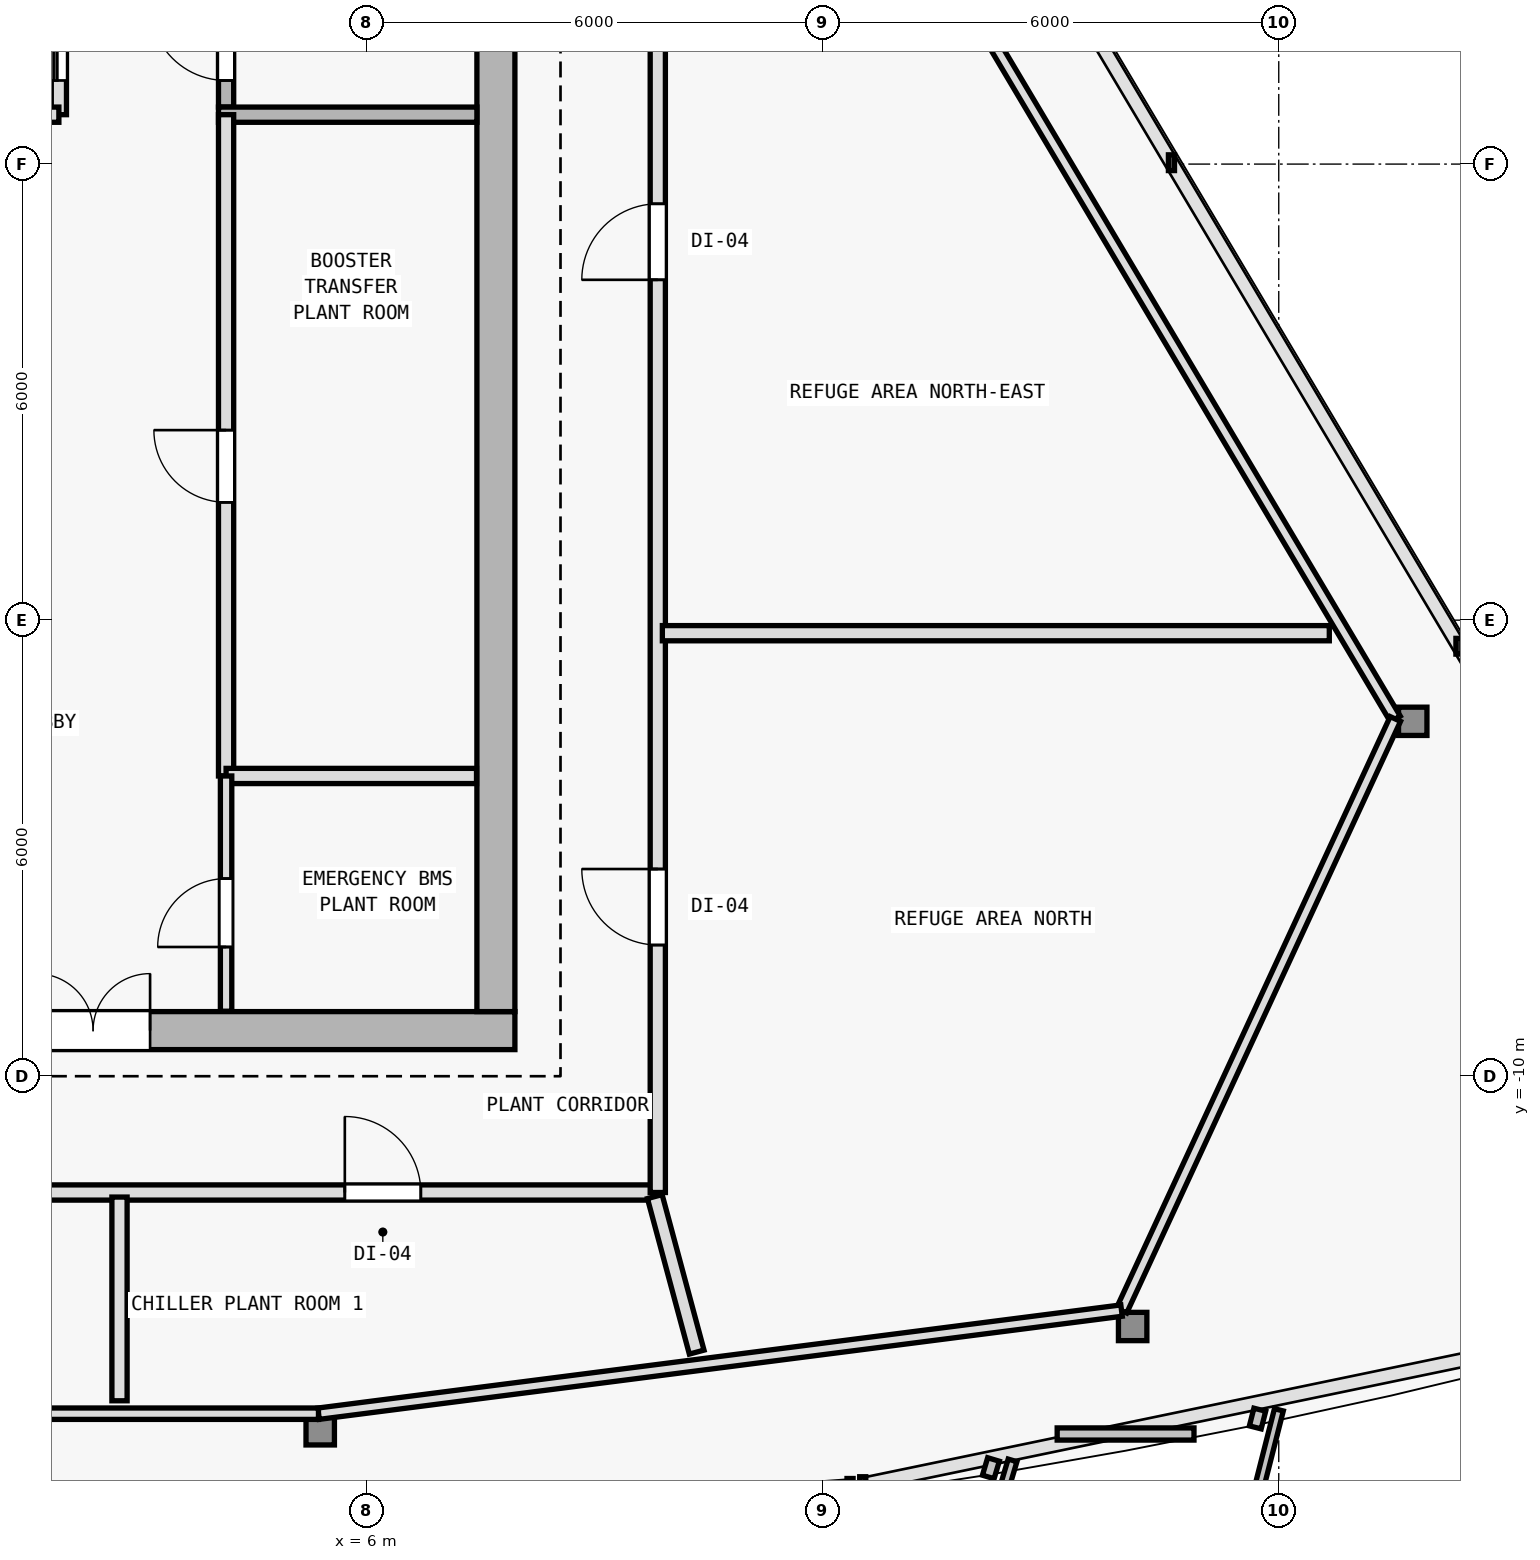
"""IFC4 building model, lengths in metres.
Left out: names, types, materials, properties, quantities, classifications, styles, units other than length and angle.
Written with IfcOpenShell. Run it as: python <this file> out.ifc"""

import sys

from ifc_helpers import new_model, si_unit, direction, frame, frame_2d, origin, origin_2d, place, context, subcontext, project, spatial, rectangle, i_section, extrude, element, fill, save


model = new_model("IFC4")
c1 = context("Model", 3, precision=1e-05, world=origin(), true_north=direction((0.0, 1.0)))
c2 = subcontext(c1, "Body", "Model", "MODEL_VIEW")
j1 = project(units=[si_unit("LENGTHUNIT", "METRE"), si_unit("PLANEANGLEUNIT", "RADIAN")], contexts=[c1])
p1 = place(None, origin())
s1 = spatial("IfcSite", under=j1, at=p1, CompositionType="ELEMENT")
p2 = place(p1, origin())
s2 = spatial("IfcBuilding", under=s1, at=p2, CompositionType="ELEMENT")
p3 = place(p2, frame((0.0, 0.0, 241.5)))
s3 = spatial("IfcBuildingStorey", under=s2, at=p3, CompositionType="ELEMENT", Elevation=241.5)
for number, where, z_axis, x_axis in (
    (1, (7.7, -9.4, 0.0), (0.0, 0.0, 1.0), (1.0, 0.0, 0.0)),
    (2, (7.7, 0.4, 0.0), (0.0, 0.0, 1.0), (1.0, 0.0, 0.0)),
):
    element("IfcColumn", number, at=place(p3, frame(where, z_axis=z_axis, x_axis=x_axis)), inside=s3, PredefinedType="COLUMN", context=c2, shape_type="SweptSolid", body=[
        extrude(i_section(OverallWidth=0.398, OverallDepth=0.387, WebThickness=0.013, FlangeThickness=0.022, FilletRadius=0.015, at=origin_2d()), origin(), (0.0, 0.0, 1.0), 4.8),
    ])
p4 = place(p3, frame((5.388, -14.665, 0.006), z_axis=(-0.005300026585, 0.027213598042, 0.999615591015), x_axis=(-0.981557946631, -0.191164843539, 0.0)))
e3 = element("IfcColumn", 3, at=p4, inside=s3, PredefinedType="COLUMN", context=c2, shape_type="SweptSolid", body=[
    extrude(i_section(OverallWidth=0.374, OverallDepth=0.372, WebThickness=0.012, FlangeThickness=0.02, FilletRadius=0.015, at=origin_2d()), origin(), (0.0, 0.0, 1.0), 4.791),
])
p5 = place(p3, frame((16.078, -13.293, 0.006), z_axis=(-0.01589889458, 0.025784745697, 0.999541080717), x_axis=(-0.851195920716, -0.524848077596, 0.0)))
e4 = element("IfcColumn", 4, at=p5, inside=s3, PredefinedType="COLUMN", context=c2, shape_type="SweptSolid", body=[
    extrude(i_section(OverallWidth=0.374, OverallDepth=0.372, WebThickness=0.012, FlangeThickness=0.02, FilletRadius=0.015, at=origin_2d()), origin(), (0.0, 0.0, 1.0), 4.791),
])
p6 = place(p3, frame((19.763, -5.331, 0.006), z_axis=(-0.020079845425, 0.016614288347, 0.999660324926), x_axis=(-0.637487669625, -0.770460557768, 0.0)))
e5 = element("IfcColumn", 5, at=p6, inside=s3, PredefinedType="COLUMN", context=c2, shape_type="SweptSolid", body=[
    extrude(i_section(OverallWidth=0.374, OverallDepth=0.372, WebThickness=0.012, FlangeThickness=0.02, FilletRadius=0.015, at=origin_2d()), origin(), (0.0, 0.0, 1.0), 4.791),
])
p7 = place(p3, frame((-7.95, -9.4, 0.0), z_axis=(0.0, 0.0, 1.0), x_axis=(1.0, 0.0, 0.0)))
e6 = element("IfcWall", 6, at=p7, inside=s3, PredefinedType="SHEAR", context=c2, shape_type="SweptSolid", body=[
    extrude(rectangle(XDim=15.9, YDim=0.5, at=frame_2d((7.95, 0.0))), origin(), (0.0, 0.0, 1.0), 4.5),
])
p8 = place(p7, frame((9.6, 0.0, 0.0)))
e7 = element("IfcOpeningElement", 7, at=p8, cuts=e6, PredefinedType="OPENING", context=c2, shape_type="SweptSolid", body=[
    extrude(rectangle(XDim=1.5, YDim=2.2, at=frame_2d((0.75, 1.1))), frame((0.0, 0.26, 0.0), z_axis=(0.0, -1.0, 0.0), x_axis=(1.0, 0.0, 0.0)), (0.0, 0.0, 1.0), 0.52),
])
p9 = place(p3, frame((7.7, 9.95, 0.0), z_axis=(0.0, 0.0, 1.0), x_axis=(0.0, -1.0, 0.0)))
e8 = element("IfcWall", 8, at=p9, inside=s3, PredefinedType="SHEAR", context=c2, shape_type="SweptSolid", body=[
    extrude(rectangle(XDim=19.1, YDim=0.5, at=frame_2d((9.55, 0.0))), origin(), (0.0, 0.0, 1.0), 4.5),
])
p10 = place(p3, frame((4.15, 2.75, 0.0), z_axis=(0.0, 0.0, 1.0), x_axis=(0.0, 1.0, 0.0)))
e9 = element("IfcWall", 9, at=p10, inside=s3, PredefinedType="SOLIDWALL", context=c2, shape_type="SweptSolid", body=[
    extrude(rectangle(XDim=7.2, YDim=0.2, at=frame_2d((3.6, 0.0))), origin(), (0.0, 0.0, 1.0), 4.5),
])
p11 = place(p10, frame((0.35, 0.0, 0.0)))
e10 = element("IfcOpeningElement", 10, at=p11, cuts=e9, PredefinedType="OPENING", context=c2, shape_type="SweptSolid", body=[
    extrude(rectangle(XDim=1.0, YDim=2.15, at=frame_2d((0.5, 1.075))), frame((0.0, 0.11, 0.0), z_axis=(0.0, -1.0, 0.0), x_axis=(1.0, 0.0, 0.0)), (0.0, 0.0, 1.0), 0.22),
])
p12 = place(p3, frame((4.05, 2.65, 0.0), z_axis=(0.0, 0.0, 1.0), x_axis=(1.0, 0.0, 0.0)))
e11 = element("IfcWall", 11, at=p12, inside=s3, PredefinedType="SOLIDWALL", context=c2, shape_type="SweptSolid", body=[
    extrude(rectangle(XDim=3.4, YDim=0.2, at=frame_2d((1.7, 0.0))), origin(), (0.0, 0.0, 1.0), 4.5),
])
p13 = place(p3, frame((4.15, -6.05, 0.0), z_axis=(0.0, 0.0, 1.0), x_axis=(0.0, 1.0, 0.0)))
e12 = element("IfcWall", 12, at=p13, inside=s3, PredefinedType="SOLIDWALL", context=c2, shape_type="SweptSolid", body=[
    extrude(rectangle(XDim=8.7, YDim=0.2, at=frame_2d((4.35, 0.0))), origin(), (0.0, 0.0, 1.0), 4.5),
])
p14 = place(p13, frame((3.6, 0.0, 0.0)))
e13 = element("IfcOpeningElement", 13, at=p14, cuts=e12, PredefinedType="OPENING", context=c2, shape_type="SweptSolid", body=[
    extrude(rectangle(XDim=0.95, YDim=2.1, at=frame_2d((0.475, 1.05))), frame((0.0, 0.11, 0.0), z_axis=(0.0, -1.0, 0.0), x_axis=(1.0, 0.0, 0.0)), (0.0, 0.0, 1.0), 0.22),
])
p15 = place(p3, frame((1.95, 2.65, 0.0), z_axis=(0.0, 0.0, 1.0), x_axis=(0.0, 1.0, 0.0)))
e14 = element("IfcWall", 14, at=p15, inside=s3, PredefinedType="SOLIDWALL", context=c2, shape_type="SweptSolid", body=[
    extrude(rectangle(XDim=7.295, YDim=0.2, at=frame_2d((3.647, 0.0))), origin(), (0.0, 0.0, 1.0), 4.5),
])
p16 = place(p15, frame((0.45, 0.0, 0.0)))
e15 = element("IfcOpeningElement", 15, at=p16, cuts=e14, PredefinedType="OPENING", context=c2, shape_type="SweptSolid", body=[
    extrude(rectangle(XDim=1.1, YDim=2.15, at=frame_2d((0.55, 1.075))), frame((0.0, 0.11, 0.0), z_axis=(0.0, -1.0, 0.0), x_axis=(1.0, 0.0, 0.0)), (0.0, 0.0, 1.0), 0.22),
])
p17 = place(p15, frame((2.25, 0.0, 0.0)))
e16 = element("IfcOpeningElement", 16, at=p17, cuts=e14, PredefinedType="OPENING", context=c2, shape_type="SweptSolid", body=[
    extrude(rectangle(XDim=1.1, YDim=2.15, at=frame_2d((0.55, 1.075))), frame((0.0, 0.11, 0.0), z_axis=(0.0, -1.0, 0.0), x_axis=(1.0, 0.0, 0.0)), (0.0, 0.0, 1.0), 0.22),
])
p18 = place(p15, frame((4.05, 0.0, 0.0)))
e17 = element("IfcOpeningElement", 17, at=p18, cuts=e14, PredefinedType="OPENING", context=c2, shape_type="SweptSolid", body=[
    extrude(rectangle(XDim=1.1, YDim=2.15, at=frame_2d((0.55, 1.075))), frame((0.0, 0.11, 0.0), z_axis=(0.0, -1.0, 0.0), x_axis=(1.0, 0.0, 0.0)), (0.0, 0.0, 1.0), 0.22),
])
p19 = place(p15, frame((5.85, 0.0, 0.0)))
e18 = element("IfcOpeningElement", 18, at=p19, cuts=e14, PredefinedType="OPENING", context=c2, shape_type="SweptSolid", body=[
    extrude(rectangle(XDim=1.1, YDim=2.15, at=frame_2d((0.55, 1.075))), frame((0.0, 0.11, 0.0), z_axis=(0.0, -1.0, 0.0), x_axis=(1.0, 0.0, 0.0)), (0.0, 0.0, 1.0), 0.22),
])
p20 = place(p3, frame((-0.95, 2.65, 0.0), z_axis=(0.0, 0.0, 1.0), x_axis=(1.0, 0.0, 0.0)))
e19 = element("IfcWall", 19, at=p20, inside=s3, PredefinedType="SOLIDWALL", context=c2, shape_type="SweptSolid", body=[
    extrude(rectangle(XDim=2.9, YDim=0.2, at=frame_2d((1.45, 0.0))), origin(), (0.0, 0.0, 1.0), 4.5),
])
p21 = place(p3, frame((4.15, -6.05, 0.0), z_axis=(0.0, 0.0, 1.0), x_axis=(1.0, 0.0, 0.0)))
e20 = element("IfcWall", 20, at=p21, inside=s3, PredefinedType="SOLIDWALL", context=c2, shape_type="SweptSolid", body=[
    extrude(rectangle(XDim=3.295, YDim=0.2, at=frame_2d((1.647, 0.0))), origin(), (0.0, 0.0, 1.0), 4.5),
])
p22 = place(p3, frame((4.15, -9.145, 0.0), z_axis=(0.0, 0.0, 1.0), x_axis=(0.0, 1.0, 0.0)))
e21 = element("IfcWall", 21, at=p22, inside=s3, PredefinedType="PARTITIONING", context=c2, shape_type="SweptSolid", body=[
    extrude(rectangle(XDim=3.095, YDim=0.15, at=frame_2d((1.547, 0.0))), origin(), (0.0, 0.0, 1.0), 4.5),
])
p23 = place(p22, frame((0.845, 0.0, 0.0)))
e22 = element("IfcOpeningElement", 22, at=p23, cuts=e21, PredefinedType="OPENING", context=c2, shape_type="SweptSolid", body=[
    extrude(rectangle(XDim=0.9, YDim=2.1, at=frame_2d((0.45, 1.05))), frame((0.0, 0.085, 0.0), z_axis=(0.0, -1.0, 0.0), x_axis=(1.0, 0.0, 0.0)), (0.0, 0.0, 1.0), 0.17),
])
p24 = place(p3, frame((13.927, 4.13, 0.0), z_axis=(0.0, 0.0, 1.0), x_axis=(0.511085167896, -0.859530075772, 0.0)))
e23 = element("IfcWall", 23, at=p24, inside=s3, PredefinedType="PARTITIONING", context=c2, shape_type="SweptSolid", body=[
    extrude(rectangle(XDim=10.972, YDim=0.15, at=frame_2d((5.486, 0.0))), origin(), (0.0, 0.0, 1.0), 4.025),
])
p25 = place(p3, frame((19.534, -5.3, 0.0), z_axis=(0.0, 0.0, 1.0), x_axis=(-0.42002371966, -0.907513126584, 0.0)))
e24 = element("IfcWall", 24, at=p25, inside=s3, PredefinedType="PARTITIONING", context=c2, shape_type="SweptSolid", body=[
    extrude(rectangle(XDim=8.576, YDim=0.15, at=frame_2d((4.288, 0.0))), origin(), (0.0, 0.0, 1.0), 4.025),
])
p26 = place(p3, frame((15.932, -13.083, 0.0), z_axis=(0.0, 0.0, 1.0), x_axis=(-0.991857335362, -0.127353941002, 0.0)))
e25 = element("IfcWall", 25, at=p26, inside=s3, PredefinedType="PARTITIONING", context=c2, shape_type="SweptSolid", body=[
    extrude(rectangle(XDim=10.653, YDim=0.15, at=frame_2d((5.326, 0.0))), origin(), (0.0, 0.0, 1.0), 4.125),
])
p27 = place(p3, frame((5.365, -14.44, 0.0), z_axis=(0.0, 0.0, 1.0), x_axis=(-1.0, 0.0, 0.0)))
e26 = element("IfcWall", 26, at=p27, inside=s3, PredefinedType="PARTITIONING", context=c2, shape_type="SweptSolid", body=[
    extrude(rectangle(XDim=10.731, YDim=0.15, at=frame_2d((5.365, 0.0))), origin(), (0.0, 0.0, 1.0), 4.125),
])
p28 = place(p3, frame((-9.83, -11.53, 0.0), z_axis=(0.0, 0.0, 1.0), x_axis=(1.0, 0.0, 0.0)))
e27 = element("IfcWall", 27, at=p28, inside=s3, PredefinedType="SOLIDWALL", context=c2, shape_type="SweptSolid", body=[
    extrude(rectangle(XDim=19.66, YDim=0.2, at=frame_2d((9.83, 0.0))), origin(), (0.0, 0.0, 1.0), 4.155),
])
p29 = place(p28, frame((5.865, 0.0, 0.0)))
e28 = element("IfcOpeningElement", 28, at=p29, cuts=e27, PredefinedType="OPENING", context=c2, shape_type="SweptSolid", body=[
    extrude(rectangle(XDim=1.0, YDim=2.15, at=frame_2d((0.5, 1.075))), frame((0.0, 0.11, 0.0), z_axis=(0.0, -1.0, 0.0), x_axis=(1.0, 0.0, 0.0)), (0.0, 0.0, 1.0), 0.22),
])
p30 = place(p28, frame((15.542, 0.0, 0.0)))
e29 = element("IfcOpeningElement", 29, at=p30, cuts=e27, PredefinedType="OPENING", context=c2, shape_type="SweptSolid", body=[
    extrude(rectangle(XDim=1.0, YDim=2.15, at=frame_2d((0.5, 1.075))), frame((0.0, 0.11, 0.0), z_axis=(0.0, -1.0, 0.0), x_axis=(1.0, 0.0, 0.0)), (0.0, 0.0, 1.0), 0.22),
])
p31 = place(p3, frame((9.83, -11.53, 0.0), z_axis=(0.0, 0.0, 1.0), x_axis=(0.0, 1.0, 0.0)))
e30 = element("IfcWall", 30, at=p31, inside=s3, PredefinedType="SOLIDWALL", context=c2, shape_type="SweptSolid", body=[
    extrude(rectangle(XDim=17.81, YDim=0.2, at=frame_2d((8.905, 0.0))), origin(), (0.0, 0.0, 1.0), 3.875),
])
p32 = place(p31, frame((3.256, 0.0, 0.0)))
e31 = element("IfcOpeningElement", 31, at=p32, cuts=e30, PredefinedType="OPENING", context=c2, shape_type="SweptSolid", body=[
    extrude(rectangle(XDim=1.0, YDim=2.15, at=frame_2d((0.5, 1.075))), frame((0.0, 0.11, 0.0), z_axis=(0.0, -1.0, 0.0), x_axis=(1.0, 0.0, 0.0)), (0.0, 0.0, 1.0), 0.22),
])
p33 = place(p31, frame((12.008, 0.0, 0.0)))
e32 = element("IfcOpeningElement", 32, at=p33, cuts=e30, PredefinedType="OPENING", context=c2, shape_type="SweptSolid", body=[
    extrude(rectangle(XDim=1.0, YDim=2.15, at=frame_2d((0.5, 1.075))), frame((0.0, 0.11, 0.0), z_axis=(0.0, -1.0, 0.0), x_axis=(1.0, 0.0, 0.0)), (0.0, 0.0, 1.0), 0.22),
])
p34 = place(p3, frame((2.748, -11.59, 0.0), z_axis=(0.0, 0.0, 1.0), x_axis=(0.0, -1.0, 0.0)))
e33 = element("IfcWall", 33, at=p34, inside=s3, PredefinedType="SOLIDWALL", context=c2, shape_type="SweptSolid", body=[
    extrude(rectangle(XDim=2.68, YDim=0.2, at=frame_2d((1.34, 0.0))), origin(), (0.0, 0.0, 1.0), 4.075),
])
p35 = place(p3, frame((9.791, -11.584, 0.0), z_axis=(0.0, 0.0, 1.0), x_axis=(0.260035449491, -0.96559907053, 0.0)))
e34 = element("IfcWall", 34, at=p35, inside=s3, PredefinedType="SOLIDWALL", context=c2, shape_type="SweptSolid", body=[
    extrude(rectangle(XDim=2.119, YDim=0.2, at=frame_2d((1.06, 0.0))), origin(), (0.0, 0.0, 1.0), 4.115),
])
p36 = place(p3, frame((9.89, -4.172, 0.0), z_axis=(0.0, 0.0, 1.0), x_axis=(1.0, 0.0, 0.0)))
e35 = element("IfcWall", 35, at=p36, inside=s3, PredefinedType="SOLIDWALL", context=c2, shape_type="SweptSolid", body=[
    extrude(rectangle(XDim=8.775, YDim=0.2, at=frame_2d((4.388, 0.0))), origin(), (0.0, 0.0, 1.0), 3.875),
])
p37 = place(p8, origin())
e36 = element("IfcDoor", 36, at=p37, inside=s3, OperationType="DOUBLE_DOOR_SINGLE_SWING", PredefinedType="DOOR", context=c2, shape_type="SweptSolid", body=[
    extrude(rectangle(XDim=1.5, YDim=2.2, at=frame_2d((0.75, 1.1))), frame((0.0, 0.025, 0.0), z_axis=(0.0, -1.0, 0.0), x_axis=(1.0, 0.0, 0.0)), (0.0, 0.0, 1.0), 0.05),
])
fill(e7, e36)
p38 = place(p11, origin())
e37 = element("IfcDoor", 37, at=p38, inside=s3, OperationType="SINGLE_SWING_RIGHT", PredefinedType="DOOR", context=c2, shape_type="SweptSolid", body=[
    extrude(rectangle(XDim=1.0, YDim=2.15, at=frame_2d((0.5, 1.075))), frame((0.0, 0.025, 0.0), z_axis=(0.0, -1.0, 0.0), x_axis=(1.0, 0.0, 0.0)), (0.0, 0.0, 1.0), 0.05),
])
fill(e10, e37)
p39 = place(p14, origin())
e38 = element("IfcDoor", 38, at=p39, inside=s3, OperationType="SINGLE_SWING_RIGHT", PredefinedType="DOOR", context=c2, shape_type="SweptSolid", body=[
    extrude(rectangle(XDim=0.95, YDim=2.1, at=frame_2d((0.475, 1.05))), frame((0.0, 0.025, 0.0), z_axis=(0.0, -1.0, 0.0), x_axis=(1.0, 0.0, 0.0)), (0.0, 0.0, 1.0), 0.05),
])
fill(e13, e38)
p40 = place(p16, origin())
e39 = element("IfcDoor", 39, at=p40, inside=s3, OperationType="DOUBLE_DOOR_SLIDING", PredefinedType="DOOR", context=c2, shape_type="SweptSolid", body=[
    extrude(rectangle(XDim=1.1, YDim=2.15, at=frame_2d((0.55, 1.075))), frame((0.0, 0.025, 0.0), z_axis=(0.0, -1.0, 0.0), x_axis=(1.0, 0.0, 0.0)), (0.0, 0.0, 1.0), 0.05),
])
fill(e15, e39)
p41 = place(p23, origin())
e40 = element("IfcDoor", 40, at=p41, inside=s3, OperationType="SINGLE_SWING_LEFT", PredefinedType="DOOR", context=c2, shape_type="SweptSolid", body=[
    extrude(rectangle(XDim=0.9, YDim=2.1, at=frame_2d((0.45, 1.05))), frame((0.0, 0.025, 0.0), z_axis=(0.0, -1.0, 0.0), x_axis=(1.0, 0.0, 0.0)), (0.0, 0.0, 1.0), 0.05),
])
fill(e22, e40)
p42 = place(p30, origin())
e41 = element("IfcDoor", 41, at=p42, inside=s3, OperationType="SINGLE_SWING_LEFT", PredefinedType="DOOR", context=c2, shape_type="SweptSolid", body=[
    extrude(rectangle(XDim=1.0, YDim=2.15, at=frame_2d((0.5, 1.075))), frame((0.0, 0.025, 0.0), z_axis=(0.0, -1.0, 0.0), x_axis=(1.0, 0.0, 0.0)), (0.0, 0.0, 1.0), 0.05),
])
fill(e29, e41)
p43 = place(p32, origin())
e42 = element("IfcDoor", 42, at=p43, inside=s3, OperationType="SINGLE_SWING_RIGHT", PredefinedType="DOOR", context=c2, shape_type="SweptSolid", body=[
    extrude(rectangle(XDim=1.0, YDim=2.15, at=frame_2d((0.5, 1.075))), frame((0.0, 0.025, 0.0), z_axis=(0.0, -1.0, 0.0), x_axis=(1.0, 0.0, 0.0)), (0.0, 0.0, 1.0), 0.05),
])
fill(e31, e42)
p44 = place(p33, origin())
e43 = element("IfcDoor", 43, at=p44, inside=s3, OperationType="SINGLE_SWING_LEFT", PredefinedType="DOOR", context=c2, shape_type="SweptSolid", body=[
    extrude(rectangle(XDim=1.0, YDim=2.15, at=frame_2d((0.5, 1.075))), frame((0.0, 0.025, 0.0), z_axis=(0.0, -1.0, 0.0), x_axis=(1.0, 0.0, 0.0)), (0.0, 0.0, 1.0), 0.05),
])
fill(e32, e43)
save(model, sys.argv[1])
